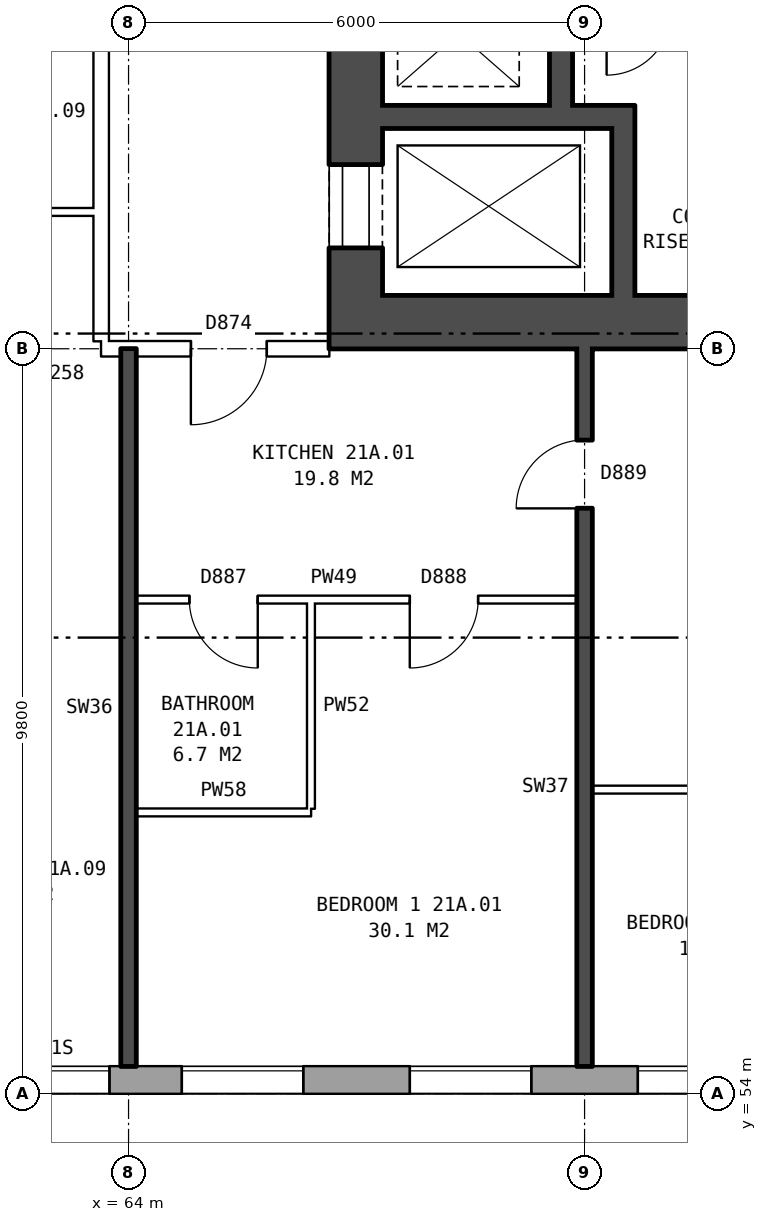
"""IFC4 building model, lengths in metres.
Left out: names, types, materials, properties, quantities, classifications, styles, units other than length and angle.
Written with IfcOpenShell. Run it as: python <this file> out.ifc"""

import sys

from ifc_helpers import new_model, si_unit, direction, frame, frame_2d, origin, place, context, subcontext, project, spatial, rectangle, extrude, element, fill, save


model = new_model("IFC4")
c1 = context("Model", 3, precision=1e-05, world=origin(), true_north=direction((0.0, 1.0)))
c2 = subcontext(c1, "Body", "Model", "MODEL_VIEW")
j1 = project(units=[si_unit("LENGTHUNIT", "METRE"), si_unit("PLANEANGLEUNIT", "RADIAN")], contexts=[c1])
p1 = place(None, origin())
s1 = spatial("IfcSite", under=j1, at=p1, CompositionType="ELEMENT")
p2 = place(p1, origin())
s2 = spatial("IfcBuilding", under=s1, at=p2, CompositionType="ELEMENT")
p3 = place(p2, frame((0.0, 0.0, 77.8)))
s3 = spatial("IfcBuildingStorey", under=s2, at=p3, CompositionType="ELEMENT", Elevation=77.8)
p4 = place(p3, frame((26.325, 54.18, 0.0), z_axis=(0.0, 0.0, 1.0), x_axis=(1.0, 0.0, 0.0)))
e1 = element("IfcWall", 1, at=p4, inside=s3, PredefinedType="STANDARD", context=c2, shape_type="SweptSolid", body=[
    extrude(rectangle(XDim=46.601, YDim=0.36, at=frame_2d((23.3, 0.0))), origin(), (0.0, 0.0, 1.0), 2.85),
])
p5 = place(p4, frame((2.375, 0.0, 0.8)))
e2 = element("IfcOpeningElement", 2, at=p5, cuts=e1, PredefinedType="OPENING", context=c2, shape_type="SweptSolid", body=[
    extrude(rectangle(XDim=1.6, YDim=1.8, at=frame_2d((0.8, 0.9))), frame((0.0, 0.19, 0.0), z_axis=(0.0, -1.0, 0.0), x_axis=(1.0, 0.0, 0.0)), (0.0, 0.0, 1.0), 0.38),
])
p6 = place(p4, frame((5.375, 0.0, 0.8)))
e3 = element("IfcOpeningElement", 3, at=p6, cuts=e1, PredefinedType="OPENING", context=c2, shape_type="SweptSolid", body=[
    extrude(rectangle(XDim=1.6, YDim=1.8, at=frame_2d((0.8, 0.9))), frame((0.0, 0.19, 0.0), z_axis=(0.0, -1.0, 0.0), x_axis=(1.0, 0.0, 0.0)), (0.0, 0.0, 1.0), 0.38),
])
p7 = place(p4, frame((7.875, 0.0, 0.8)))
e4 = element("IfcOpeningElement", 4, at=p7, cuts=e1, PredefinedType="OPENING", context=c2, shape_type="SweptSolid", body=[
    extrude(rectangle(XDim=1.6, YDim=1.8, at=frame_2d((0.8, 0.9))), frame((0.0, 0.19, 0.0), z_axis=(0.0, -1.0, 0.0), x_axis=(1.0, 0.0, 0.0)), (0.0, 0.0, 1.0), 0.38),
])
p8 = place(p4, frame((11.725, 0.0, 0.65)))
e5 = element("IfcOpeningElement", 5, at=p8, cuts=e1, PredefinedType="OPENING", context=c2, shape_type="SweptSolid", body=[
    extrude(rectangle(XDim=0.8, YDim=0.9, at=frame_2d((0.4, 0.45))), frame((0.0, 0.19, 0.0), z_axis=(0.0, -1.0, 0.0), x_axis=(1.0, 0.0, 0.0)), (0.0, 0.0, 1.0), 0.38),
])
p9 = place(p4, frame((14.375, 0.0, 0.8)))
e6 = element("IfcOpeningElement", 6, at=p9, cuts=e1, PredefinedType="OPENING", context=c2, shape_type="SweptSolid", body=[
    extrude(rectangle(XDim=1.6, YDim=1.8, at=frame_2d((0.8, 0.9))), frame((0.0, 0.19, 0.0), z_axis=(0.0, -1.0, 0.0), x_axis=(1.0, 0.0, 0.0)), (0.0, 0.0, 1.0), 0.38),
])
p10 = place(p4, frame((17.375, 0.0, 0.8)))
e7 = element("IfcOpeningElement", 7, at=p10, cuts=e1, PredefinedType="OPENING", context=c2, shape_type="SweptSolid", body=[
    extrude(rectangle(XDim=1.6, YDim=1.8, at=frame_2d((0.8, 0.9))), frame((0.0, 0.19, 0.0), z_axis=(0.0, -1.0, 0.0), x_axis=(1.0, 0.0, 0.0)), (0.0, 0.0, 1.0), 0.38),
])
p11 = place(p4, frame((20.375, 0.0, 0.8)))
e8 = element("IfcOpeningElement", 8, at=p11, cuts=e1, PredefinedType="OPENING", context=c2, shape_type="SweptSolid", body=[
    extrude(rectangle(XDim=1.6, YDim=1.8, at=frame_2d((0.8, 0.9))), frame((0.0, 0.19, 0.0), z_axis=(0.0, -1.0, 0.0), x_axis=(1.0, 0.0, 0.0)), (0.0, 0.0, 1.0), 0.38),
])
p12 = place(p4, frame((23.375, 0.0, 0.8)))
e9 = element("IfcOpeningElement", 9, at=p12, cuts=e1, PredefinedType="OPENING", context=c2, shape_type="SweptSolid", body=[
    extrude(rectangle(XDim=1.6, YDim=1.8, at=frame_2d((0.8, 0.9))), frame((0.0, 0.19, 0.0), z_axis=(0.0, -1.0, 0.0), x_axis=(1.0, 0.0, 0.0)), (0.0, 0.0, 1.0), 0.38),
])
p13 = place(p4, frame((26.375, 0.0, 0.8)))
e10 = element("IfcOpeningElement", 10, at=p13, cuts=e1, PredefinedType="OPENING", context=c2, shape_type="SweptSolid", body=[
    extrude(rectangle(XDim=1.6, YDim=1.8, at=frame_2d((0.8, 0.9))), frame((0.0, 0.19, 0.0), z_axis=(0.0, -1.0, 0.0), x_axis=(1.0, 0.0, 0.0)), (0.0, 0.0, 1.0), 0.38),
])
p14 = place(p4, frame((29.375, 0.0, 0.8)))
e11 = element("IfcOpeningElement", 11, at=p14, cuts=e1, PredefinedType="OPENING", context=c2, shape_type="SweptSolid", body=[
    extrude(rectangle(XDim=1.6, YDim=1.8, at=frame_2d((0.8, 0.9))), frame((0.0, 0.19, 0.0), z_axis=(0.0, -1.0, 0.0), x_axis=(1.0, 0.0, 0.0)), (0.0, 0.0, 1.0), 0.38),
])
p15 = place(p4, frame((32.375, 0.0, 0.8)))
e12 = element("IfcOpeningElement", 12, at=p15, cuts=e1, PredefinedType="OPENING", context=c2, shape_type="SweptSolid", body=[
    extrude(rectangle(XDim=1.6, YDim=1.8, at=frame_2d((0.8, 0.9))), frame((0.0, 0.19, 0.0), z_axis=(0.0, -1.0, 0.0), x_axis=(1.0, 0.0, 0.0)), (0.0, 0.0, 1.0), 0.38),
])
p16 = place(p4, frame((34.825, 0.0, 0.15)))
e13 = element("IfcOpeningElement", 13, at=p16, cuts=e1, PredefinedType="OPENING", context=c2, shape_type="SweptSolid", body=[
    extrude(rectangle(XDim=0.6, YDim=0.9, at=frame_2d((0.3, 0.45))), frame((0.0, 0.19, 0.0), z_axis=(0.0, -1.0, 0.0), x_axis=(1.0, 0.0, 0.0)), (0.0, 0.0, 1.0), 0.38),
])
p17 = place(p4, frame((38.375, 0.0, 0.8)))
e14 = element("IfcOpeningElement", 14, at=p17, cuts=e1, PredefinedType="OPENING", context=c2, shape_type="SweptSolid", body=[
    extrude(rectangle(XDim=1.6, YDim=1.8, at=frame_2d((0.8, 0.9))), frame((0.0, 0.19, 0.0), z_axis=(0.0, -1.0, 0.0), x_axis=(1.0, 0.0, 0.0)), (0.0, 0.0, 1.0), 0.38),
])
p18 = place(p4, frame((41.375, 0.0, 0.8)))
e15 = element("IfcOpeningElement", 15, at=p18, cuts=e1, PredefinedType="OPENING", context=c2, shape_type="SweptSolid", body=[
    extrude(rectangle(XDim=1.6, YDim=1.8, at=frame_2d((0.8, 0.9))), frame((0.0, 0.19, 0.0), z_axis=(0.0, -1.0, 0.0), x_axis=(1.0, 0.0, 0.0)), (0.0, 0.0, 1.0), 0.38),
])
p19 = place(p4, frame((44.375, 0.0, 0.8)))
e16 = element("IfcOpeningElement", 16, at=p19, cuts=e1, PredefinedType="OPENING", context=c2, shape_type="SweptSolid", body=[
    extrude(rectangle(XDim=1.6, YDim=1.8, at=frame_2d((0.8, 0.9))), frame((0.0, 0.19, 0.0), z_axis=(0.0, -1.0, 0.0), x_axis=(1.0, 0.0, 0.0)), (0.0, 0.0, 1.0), 0.38),
])
p20 = place(p4, frame((9.775, 0.0, 1.5)))
e17 = element("IfcOpeningElement", 17, at=p20, cuts=e1, PredefinedType="OPENING", context=c2, shape_type="SweptSolid", body=[
    extrude(rectangle(XDim=0.6, YDim=0.9, at=frame_2d((0.3, 0.45))), frame((0.0, 0.19, 0.0), z_axis=(0.0, -1.0, 0.0), x_axis=(1.0, 0.0, 0.0)), (0.0, 0.0, 1.0), 0.38),
])
p21 = place(p4, frame((12.825, 0.0, 0.65)))
e18 = element("IfcOpeningElement", 18, at=p21, cuts=e1, PredefinedType="OPENING", context=c2, shape_type="SweptSolid", body=[
    extrude(rectangle(XDim=0.6, YDim=1.8, at=frame_2d((0.3, 0.9))), frame((0.0, 0.19, 0.0), z_axis=(0.0, -1.0, 0.0), x_axis=(1.0, 0.0, 0.0)), (0.0, 0.0, 1.0), 0.38),
])
p22 = place(p4, frame((36.025, 0.0, 1.65)))
e19 = element("IfcOpeningElement", 19, at=p22, cuts=e1, PredefinedType="OPENING", context=c2, shape_type="SweptSolid", body=[
    extrude(rectangle(XDim=1.4, YDim=0.9, at=frame_2d((0.7, 0.45))), frame((0.0, 0.19, 0.0), z_axis=(0.0, -1.0, 0.0), x_axis=(1.0, 0.0, 0.0)), (0.0, 0.0, 1.0), 0.38),
])
p23 = place(p3, frame((66.99, 64.5, 0.0), z_axis=(0.0, 0.0, 1.0), x_axis=(0.0, 1.0, 0.0)))
e20 = element("IfcWall", 20, at=p23, inside=s3, PredefinedType="SHEAR", context=c2, shape_type="SweptSolid", body=[
    extrude(rectangle(XDim=11.0, YDim=0.7, at=frame_2d((5.5, 0.0))), origin(), (0.0, 0.0, 1.0), 2.85),
])
p24 = place(p23, frame((0.625, 0.0, 0.0)))
e21 = element("IfcOpeningElement", 21, at=p24, cuts=e20, PredefinedType="OPENING", context=c2, shape_type="SweptSolid", body=[
    extrude(rectangle(XDim=1.1, YDim=2.1, at=frame_2d((0.55, 1.05))), frame((0.0, 0.36, 0.0), z_axis=(0.0, -1.0, 0.0), x_axis=(1.0, 0.0, 0.0)), (0.0, 0.0, 1.0), 0.72),
])
p25 = place(p23, frame((9.2, 0.0, 0.0)))
e22 = element("IfcOpeningElement", 22, at=p25, cuts=e20, PredefinedType="OPENING", context=c2, shape_type="SweptSolid", body=[
    extrude(rectangle(XDim=1.1, YDim=2.1, at=frame_2d((0.55, 1.05))), frame((0.0, 0.36, 0.0), z_axis=(0.0, -1.0, 0.0), x_axis=(1.0, 0.0, 0.0)), (0.0, 0.0, 1.0), 0.72),
])
p26 = place(p3, frame((66.64, 64.15, 0.0), z_axis=(0.0, 0.0, 1.0), x_axis=(1.0, 0.0, 0.0)))
e23 = element("IfcWall", 23, at=p26, inside=s3, PredefinedType="SHEAR", context=c2, shape_type="SweptSolid", body=[
    extrude(rectangle(XDim=9.0, YDim=0.7, at=frame_2d((4.5, 0.0))), origin(), (0.0, 0.0, 1.0), 2.85),
])
p27 = place(p3, frame((67.34, 66.85, 0.0), z_axis=(0.0, 0.0, 1.0), x_axis=(1.0, 0.0, 0.0)))
e24 = element("IfcWall", 24, at=p27, inside=s3, PredefinedType="SHEAR", context=c2, shape_type="SweptSolid", body=[
    extrude(rectangle(XDim=3.32, YDim=0.3, at=frame_2d((1.66, 0.0))), origin(), (0.0, 0.0, 1.0), 2.85),
])
p28 = place(p3, frame((69.69, 67.0, 0.0), z_axis=(0.0, 0.0, 1.0), x_axis=(0.0, 1.0, 0.0)))
e25 = element("IfcWall", 25, at=p28, inside=s3, PredefinedType="SHEAR", context=c2, shape_type="SweptSolid", body=[
    extrude(rectangle(XDim=6.6, YDim=0.3, at=frame_2d((3.3, 0.0))), origin(), (0.0, 0.0, 1.0), 2.85),
])
p29 = place(p3, frame((70.51, 64.5, 0.0), z_axis=(0.0, 0.0, 1.0), x_axis=(0.0, 1.0, 0.0)))
e26 = element("IfcWall", 26, at=p29, inside=s3, PredefinedType="SHEAR", context=c2, shape_type="SweptSolid", body=[
    extrude(rectangle(XDim=2.2, YDim=0.3, at=frame_2d((1.1, 0.0))), origin(), (0.0, 0.0, 1.0), 2.85),
])
p30 = place(p3, frame((63.64, 63.9, 0.0), z_axis=(0.0, 0.0, 1.0), x_axis=(0.0, 1.0, 0.0)))
e27 = element("IfcWall", 27, at=p30, inside=s3, PredefinedType="PARTITIONING", context=c2, shape_type="SweptSolid", body=[
    extrude(rectangle(XDim=12.2, YDim=0.2, at=frame_2d((6.1, 0.0))), origin(), (0.0, 0.0, 1.0), 2.85),
])
p31 = place(p30, frame((5.1, 0.0, 0.0)))
e28 = element("IfcOpeningElement", 28, at=p31, cuts=e27, PredefinedType="OPENING", context=c2, shape_type="SweptSolid", body=[
    extrude(rectangle(XDim=2.0, YDim=2.1, at=frame_2d((1.0, 1.05))), frame((0.0, 0.11, 0.0), z_axis=(0.0, -1.0, 0.0), x_axis=(1.0, 0.0, 0.0)), (0.0, 0.0, 1.0), 0.22),
])
p32 = place(p3, frame((64.1, 57.7, 0.0), z_axis=(0.0, 0.0, 1.0), x_axis=(1.0, 0.0, 0.0)))
e29 = element("IfcWall", 29, at=p32, inside=s3, PredefinedType="PARTITIONING", context=c2, shape_type="SweptSolid", body=[
    extrude(rectangle(XDim=2.3, YDim=0.1, at=frame_2d((1.15, 0.0))), origin(), (0.0, 0.0, 1.0), 2.85),
])
p33 = place(p3, frame((70.1, 58.0, 0.0), z_axis=(0.0, 0.0, 1.0), x_axis=(1.0, 0.0, 0.0)))
e30 = element("IfcWall", 30, at=p33, inside=s3, PredefinedType="PARTITIONING", context=c2, shape_type="SweptSolid", body=[
    extrude(rectangle(XDim=5.54, YDim=0.1, at=frame_2d((2.77, 0.0))), origin(), (0.0, 0.0, 1.0), 2.85),
])
p34 = place(p33, frame((2.32, 0.0, 0.0)))
e31 = element("IfcOpeningElement", 31, at=p34, cuts=e30, PredefinedType="OPENING", context=c2, shape_type="SweptSolid", body=[
    extrude(rectangle(XDim=0.9, YDim=2.1, at=frame_2d((0.45, 1.05))), frame((0.0, 0.06, 0.0), z_axis=(0.0, -1.0, 0.0), x_axis=(1.0, 0.0, 0.0)), (0.0, 0.0, 1.0), 0.12),
])
p35 = place(p3, frame((64.1, 60.5, 0.0), z_axis=(0.0, 0.0, 1.0), x_axis=(1.0, 0.0, 0.0)))
e32 = element("IfcWall", 32, at=p35, inside=s3, PredefinedType="PARTITIONING", context=c2, shape_type="SweptSolid", body=[
    extrude(rectangle(XDim=5.8, YDim=0.1, at=frame_2d((2.9, 0.0))), origin(), (0.0, 0.0, 1.0), 2.85),
])
p36 = place(p35, frame((3.6, 0.0, 0.0)))
e33 = element("IfcOpeningElement", 33, at=p36, cuts=e32, PredefinedType="OPENING", context=c2, shape_type="SweptSolid", body=[
    extrude(rectangle(XDim=0.9, YDim=2.1, at=frame_2d((0.45, 1.05))), frame((0.0, 0.06, 0.0), z_axis=(0.0, -1.0, 0.0), x_axis=(1.0, 0.0, 0.0)), (0.0, 0.0, 1.0), 0.12),
])
p37 = place(p35, frame((0.7, 0.0, 0.0)))
e34 = element("IfcOpeningElement", 34, at=p37, cuts=e32, PredefinedType="OPENING", context=c2, shape_type="SweptSolid", body=[
    extrude(rectangle(XDim=0.9, YDim=2.1, at=frame_2d((0.45, 1.05))), frame((0.0, 0.06, 0.0), z_axis=(0.0, -1.0, 0.0), x_axis=(1.0, 0.0, 0.0)), (0.0, 0.0, 1.0), 0.12),
])
p38 = place(p3, frame((63.64, 63.8, 0.0), z_axis=(0.0, 0.0, 1.0), x_axis=(1.0, 0.0, 0.0)))
e35 = element("IfcWall", 35, at=p38, inside=s3, PredefinedType="PARTITIONING", context=c2, shape_type="SweptSolid", body=[
    extrude(rectangle(XDim=3.0, YDim=0.2, at=frame_2d((1.5, 0.0))), origin(), (0.0, 0.0, 1.0), 2.85),
])
p39 = place(p38, frame((1.18, 0.0, 0.0)))
e36 = element("IfcOpeningElement", 36, at=p39, cuts=e35, PredefinedType="OPENING", context=c2, shape_type="SweptSolid", body=[
    extrude(rectangle(XDim=1.0, YDim=2.1, at=frame_2d((0.5, 1.05))), frame((0.0, 0.11, 0.0), z_axis=(0.0, -1.0, 0.0), x_axis=(1.0, 0.0, 0.0)), (0.0, 0.0, 1.0), 0.22),
])
p40 = place(p3, frame((61.0, 65.6, 0.0), z_axis=(0.0, 0.0, 1.0), x_axis=(1.0, 0.0, 0.0)))
e37 = element("IfcWall", 37, at=p40, inside=s3, PredefinedType="PARTITIONING", context=c2, shape_type="SweptSolid", body=[
    extrude(rectangle(XDim=2.64, YDim=0.1, at=frame_2d((1.32, 0.0))), origin(), (0.0, 0.0, 1.0), 2.85),
])
p41 = place(p3, frame((64.0, 54.36, 0.0), z_axis=(0.0, 0.0, 1.0), x_axis=(0.0, 1.0, 0.0)))
e38 = element("IfcWall", 38, at=p41, inside=s3, PredefinedType="SOLIDWALL", context=c2, shape_type="SweptSolid", body=[
    extrude(rectangle(XDim=9.44, YDim=0.2, at=frame_2d((4.72, 0.0))), origin(), (0.0, 0.0, 1.0), 2.85),
])
p42 = place(p3, frame((66.4, 57.75, 0.0), z_axis=(0.0, 0.0, 1.0), x_axis=(0.0, 1.0, 0.0)))
e39 = element("IfcWall", 39, at=p42, inside=s3, PredefinedType="PARTITIONING", context=c2, shape_type="SweptSolid", body=[
    extrude(rectangle(XDim=2.7, YDim=0.1, at=frame_2d((1.35, 0.0))), origin(), (0.0, 0.0, 1.0), 2.85),
])
p43 = place(p3, frame((70.0, 54.36, 0.0), z_axis=(0.0, 0.0, 1.0), x_axis=(0.0, 1.0, 0.0)))
e40 = element("IfcWall", 40, at=p43, inside=s3, PredefinedType="SOLIDWALL", context=c2, shape_type="SweptSolid", body=[
    extrude(rectangle(XDim=9.44, YDim=0.2, at=frame_2d((4.72, 0.0))), origin(), (0.0, 0.0, 1.0), 2.85),
])
p44 = place(p43, frame((7.34, 0.0, 0.0)))
e41 = element("IfcOpeningElement", 41, at=p44, cuts=e40, PredefinedType="OPENING", context=c2, shape_type="SweptSolid", body=[
    extrude(rectangle(XDim=0.9, YDim=2.1, at=frame_2d((0.45, 1.05))), frame((0.0, 0.11, 0.0), z_axis=(0.0, -1.0, 0.0), x_axis=(1.0, 0.0, 0.0)), (0.0, 0.0, 1.0), 0.22),
])
p45 = place(p17, origin())
e42 = element("IfcWindow", 42, at=p45, inside=s3, PartitioningType="SINGLE_PANEL", PredefinedType="WINDOW", context=c2, shape_type="SweptSolid", body=[
    extrude(rectangle(XDim=1.6, YDim=1.8, at=frame_2d((0.8, 0.9))), frame((0.0, 0.15, 0.0), z_axis=(0.0, -1.0, 0.0), x_axis=(1.0, 0.0, 0.0)), (0.0, 0.0, 1.0), 0.06),
])
fill(e14, e42)
p46 = place(p18, origin())
e43 = element("IfcWindow", 43, at=p46, inside=s3, PartitioningType="SINGLE_PANEL", PredefinedType="WINDOW", context=c2, shape_type="SweptSolid", body=[
    extrude(rectangle(XDim=1.6, YDim=1.8, at=frame_2d((0.8, 0.9))), frame((0.0, 0.15, 0.0), z_axis=(0.0, -1.0, 0.0), x_axis=(1.0, 0.0, 0.0)), (0.0, 0.0, 1.0), 0.06),
])
fill(e15, e43)
p47 = place(p19, origin())
e44 = element("IfcWindow", 44, at=p47, inside=s3, PartitioningType="SINGLE_PANEL", PredefinedType="WINDOW", context=c2, shape_type="SweptSolid", body=[
    extrude(rectangle(XDim=1.6, YDim=1.8, at=frame_2d((0.8, 0.9))), frame((0.0, 0.15, 0.0), z_axis=(0.0, -1.0, 0.0), x_axis=(1.0, 0.0, 0.0)), (0.0, 0.0, 1.0), 0.06),
])
fill(e16, e44)
p48 = place(p24, origin())
e45 = element("IfcDoor", 45, at=p48, inside=s3, OperationType="DOUBLE_DOOR_SLIDING", PredefinedType="DOOR", context=c2, shape_type="SweptSolid", body=[
    extrude(rectangle(XDim=1.1, YDim=2.1, at=frame_2d((0.55, 1.05))), frame((0.0, -0.285, 0.0), z_axis=(0.0, -1.0, 0.0), x_axis=(1.0, 0.0, 0.0)), (0.0, 0.0, 1.0), 0.05),
])
fill(e21, e45)
p49 = place(p36, frame((0.9, 0.0, 0.0), z_axis=(0.0, 0.0, 1.0), x_axis=(-1.0, 0.0, 0.0)))
e46 = element("IfcDoor", 46, at=p49, inside=s3, OperationType="SINGLE_SWING_RIGHT", PredefinedType="DOOR", context=c2, shape_type="SweptSolid", body=[
    extrude(rectangle(XDim=0.9, YDim=2.1, at=frame_2d((0.45, 1.05))), frame((0.0, 0.025, 0.0), z_axis=(0.0, -1.0, 0.0), x_axis=(1.0, 0.0, 0.0)), (0.0, 0.0, 1.0), 0.05),
])
fill(e33, e46)
p50 = place(p39, frame((1.0, 0.0, 0.0), z_axis=(0.0, 0.0, 1.0), x_axis=(-1.0, 0.0, 0.0)))
e47 = element("IfcDoor", 47, at=p50, inside=s3, OperationType="SINGLE_SWING_RIGHT", PredefinedType="DOOR", context=c2, shape_type="SweptSolid", body=[
    extrude(rectangle(XDim=1.0, YDim=2.1, at=frame_2d((0.5, 1.05))), frame((0.0, 0.025, 0.0), z_axis=(0.0, -1.0, 0.0), x_axis=(1.0, 0.0, 0.0)), (0.0, 0.0, 1.0), 0.05),
])
fill(e36, e47)
p51 = place(p44, origin())
e48 = element("IfcDoor", 48, at=p51, inside=s3, OperationType="SINGLE_SWING_LEFT", PredefinedType="DOOR", context=c2, shape_type="SweptSolid", body=[
    extrude(rectangle(XDim=0.9, YDim=2.1, at=frame_2d((0.45, 1.05))), frame((0.0, 0.025, 0.0), z_axis=(0.0, -1.0, 0.0), x_axis=(1.0, 0.0, 0.0)), (0.0, 0.0, 1.0), 0.05),
])
fill(e41, e48)
p52 = place(p37, frame((0.9, 0.0, 0.0), z_axis=(0.0, 0.0, 1.0), x_axis=(-1.0, 0.0, 0.0)))
e49 = element("IfcDoor", 49, at=p52, inside=s3, OperationType="SINGLE_SWING_LEFT", PredefinedType="DOOR", context=c2, shape_type="SweptSolid", body=[
    extrude(rectangle(XDim=0.9, YDim=2.1, at=frame_2d((0.45, 1.05))), frame((0.0, 0.025, 0.0), z_axis=(0.0, -1.0, 0.0), x_axis=(1.0, 0.0, 0.0)), (0.0, 0.0, 1.0), 0.05),
])
fill(e34, e49)
p53 = place(p22, origin())
e50 = element("IfcWindow", 50, at=p53, inside=s3, PartitioningType="SINGLE_PANEL", PredefinedType="WINDOW", context=c2, shape_type="SweptSolid", body=[
    extrude(rectangle(XDim=1.4, YDim=0.9, at=frame_2d((0.7, 0.45))), frame((0.0, 0.15, 0.0), z_axis=(0.0, -1.0, 0.0), x_axis=(1.0, 0.0, 0.0)), (0.0, 0.0, 1.0), 0.06),
])
fill(e19, e50)
save(model, sys.argv[1])
